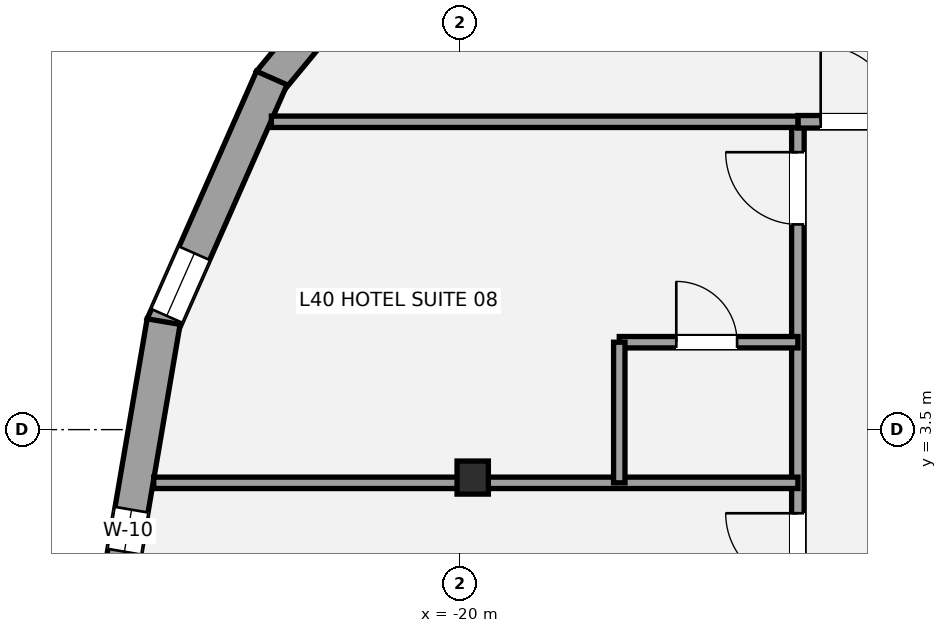
"""IFC4 building model, lengths in metres.
Left out: names, types, materials, properties, quantities, classifications, styles, units other than length and angle.
Written with IfcOpenShell. Run it as: python <this file> out.ifc"""

import sys

from ifc_helpers import new_model, si_unit, direction, frame, frame_2d, origin, origin_2d, place, context, subcontext, project, spatial, rectangle, i_section, extrude, element, fill, save


model = new_model("IFC4")
c1 = context("Model", 3, precision=1e-05, world=origin(), true_north=direction((0.0, 1.0)))
c2 = subcontext(c1, "Body", "Model", "MODEL_VIEW")
j1 = project(units=[si_unit("LENGTHUNIT", "METRE"), si_unit("PLANEANGLEUNIT", "RADIAN")], contexts=[c1])
p1 = place(None, origin())
s1 = spatial("IfcSite", under=j1, at=p1, CompositionType="ELEMENT")
p2 = place(p1, origin())
s2 = spatial("IfcBuilding", under=s1, at=p2, CompositionType="ELEMENT")
p3 = place(p2, frame((0.0, 0.0, 150.2)))
s3 = spatial("IfcBuildingStorey", under=s2, at=p3, CompositionType="ELEMENT", Elevation=150.2)
p4 = place(p3, frame((-19.828, 2.869, 0.0), z_axis=(0.0, 0.0, 1.0), x_axis=(1.0, 0.0, 0.0)))
e1 = element("IfcColumn", 1, at=p4, inside=s3, PredefinedType="COLUMN", context=c2, shape_type="SweptSolid", body=[
    extrude(i_section(OverallWidth=0.412, OverallDepth=0.435, WebThickness=0.036, FlangeThickness=0.057, at=origin_2d()), origin(), (0.0, 0.0, 1.0), 3.2),
])
p5 = place(p3, frame((-22.504, 8.075, 0.0), z_axis=(0.0, 0.0, 1.0), x_axis=(0.637002505989, 0.77086173038, 0.0)))
e2 = element("IfcWall", 2, at=p5, inside=s3, PredefinedType="STANDARD", context=c2, shape_type="SweptSolid", body=[
    extrude(rectangle(XDim=3.908, YDim=0.44, at=frame_2d((1.954, 0.0))), origin(), (0.0, 0.0, 1.0), 2.315),
])
p6 = place(p5, frame((2.76, 0.0, 0.42)))
e3 = element("IfcOpeningElement", 3, at=p6, cuts=e2, PredefinedType="OPENING", context=c2, shape_type="SweptSolid", body=[
    extrude(rectangle(XDim=0.9, YDim=1.35, at=frame_2d((0.45, 0.675))), frame((0.0, 0.23, 0.0), z_axis=(0.0, -1.0, 0.0), x_axis=(1.0, 0.0, 0.0)), (0.0, 0.0, 1.0), 0.46),
])
p7 = place(p3, frame((-23.911, 4.869, 0.0), z_axis=(0.0, 0.0, 1.0), x_axis=(0.403999745193, 0.914759097186, 0.0)))
e4 = element("IfcWall", 4, at=p7, inside=s3, PredefinedType="STANDARD", context=c2, shape_type="SweptSolid", body=[
    extrude(rectangle(XDim=3.561, YDim=0.44, at=frame_2d((1.78, 0.0))), origin(), (0.0, 0.0, 1.0), 2.315),
])
p8 = place(p7, frame((0.14, 0.0, 0.42)))
e5 = element("IfcOpeningElement", 5, at=p8, cuts=e4, PredefinedType="OPENING", context=c2, shape_type="SweptSolid", body=[
    extrude(rectangle(XDim=0.9, YDim=1.35, at=frame_2d((0.45, 0.675))), frame((0.0, 0.23, 0.0), z_axis=(0.0, -1.0, 0.0), x_axis=(1.0, 0.0, 0.0)), (0.0, 0.0, 1.0), 0.46),
])
p9 = place(p3, frame((-24.459, 1.61, 0.0), z_axis=(0.0, 0.0, 1.0), x_axis=(0.168075929829, 0.985774052109, 0.0)))
e6 = element("IfcWall", 6, at=p9, inside=s3, PredefinedType="STANDARD", context=c2, shape_type="SweptSolid", body=[
    extrude(rectangle(XDim=3.358, YDim=0.44, at=frame_2d((1.679, 0.0))), origin(), (0.0, 0.0, 1.0), 2.315),
])
p10 = place(p9, frame((0.288, 0.0, 0.58)))
e7 = element("IfcOpeningElement", 7, at=p10, cuts=e6, PredefinedType="OPENING", context=c2, shape_type="SweptSolid", body=[
    extrude(rectangle(XDim=0.56, YDim=1.15, at=frame_2d((0.28, 0.575))), frame((0.0, 0.23, 0.0), z_axis=(0.0, -1.0, 0.0), x_axis=(1.0, 0.0, 0.0)), (0.0, 0.0, 1.0), 0.46),
])
p11 = place(p3, frame((-15.55, -13.587, 0.0), z_axis=(0.0, 0.0, 1.0), x_axis=(0.0, 1.0, 0.0)))
e8 = element("IfcWall", 8, at=p11, inside=s3, PredefinedType="PARTITIONING", context=c2, shape_type="SweptSolid", body=[
    extrude(rectangle(XDim=21.137, YDim=0.165, at=frame_2d((10.568, 0.0))), origin(), (0.0, 0.0, 1.0), 2.473),
])
p12 = place(p11, frame((6.587, 0.0, 0.0)))
e9 = element("IfcOpeningElement", 9, at=p12, cuts=e8, PredefinedType="OPENING", context=c2, shape_type="SweptSolid", body=[
    extrude(rectangle(XDim=0.85, YDim=2.1, at=frame_2d((0.425, 1.05))), frame((0.0, 0.093, 0.0), z_axis=(0.0, -1.0, 0.0), x_axis=(1.0, 0.0, 0.0)), (0.0, 0.0, 1.0), 0.185),
])
p13 = place(p11, frame((10.637, 0.0, 0.0)))
e10 = element("IfcOpeningElement", 10, at=p13, cuts=e8, PredefinedType="OPENING", context=c2, shape_type="SweptSolid", body=[
    extrude(rectangle(XDim=0.95, YDim=2.15, at=frame_2d((0.475, 1.075))), frame((0.0, 0.093, 0.0), z_axis=(0.0, -1.0, 0.0), x_axis=(1.0, 0.0, 0.0)), (0.0, 0.0, 1.0), 0.185),
])
p14 = place(p11, frame((15.037, 0.0, 0.0)))
e11 = element("IfcOpeningElement", 11, at=p14, cuts=e8, PredefinedType="OPENING", context=c2, shape_type="SweptSolid", body=[
    extrude(rectangle(XDim=0.95, YDim=2.15, at=frame_2d((0.475, 1.075))), frame((0.0, 0.093, 0.0), z_axis=(0.0, -1.0, 0.0), x_axis=(1.0, 0.0, 0.0)), (0.0, 0.0, 1.0), 0.185),
])
p15 = place(p11, frame((19.787, 0.0, 0.0)))
e12 = element("IfcOpeningElement", 12, at=p15, cuts=e8, PredefinedType="OPENING", context=c2, shape_type="SweptSolid", body=[
    extrude(rectangle(XDim=0.95, YDim=2.15, at=frame_2d((0.475, 1.075))), frame((0.0, 0.093, 0.0), z_axis=(0.0, -1.0, 0.0), x_axis=(1.0, 0.0, 0.0)), (0.0, 0.0, 1.0), 0.185),
])
p16 = place(p3, frame((-15.55, 7.55, 0.0), z_axis=(0.0, 0.0, 1.0), x_axis=(1.0, 0.0, 0.0)))
e13 = element("IfcWall", 13, at=p16, inside=s3, PredefinedType="PARTITIONING", context=c2, shape_type="SweptSolid", body=[
    extrude(rectangle(XDim=1.75, YDim=0.165, at=frame_2d((0.875, 0.0))), origin(), (0.0, 0.0, 1.0), 3.02),
])
p17 = place(p16, frame((0.3, 0.0, 0.0)))
e14 = element("IfcOpeningElement", 14, at=p17, cuts=e13, PredefinedType="OPENING", context=c2, shape_type="SweptSolid", body=[
    extrude(rectangle(XDim=1.0, YDim=2.15, at=frame_2d((0.5, 1.075))), frame((0.0, 0.093, 0.0), z_axis=(0.0, -1.0, 0.0), x_axis=(1.0, 0.0, 0.0)), (0.0, 0.0, 1.0), 0.185),
])
p18 = place(p3, frame((-22.477, 7.55, 0.0), z_axis=(0.0, 0.0, 1.0), x_axis=(1.0, 0.0, 0.0)))
e15 = element("IfcWall", 15, at=p18, inside=s3, PredefinedType="PLUMBINGWALL", context=c2, shape_type="SweptSolid", body=[
    extrude(rectangle(XDim=6.927, YDim=0.15, at=frame_2d((3.464, 0.0))), origin(), (0.0, 0.0, 1.0), 2.473),
])
p19 = place(p3, frame((-24.025, 2.8, 0.0), z_axis=(0.0, 0.0, 1.0), x_axis=(1.0, 0.0, 0.0)))
e16 = element("IfcWall", 16, at=p19, inside=s3, PredefinedType="PLUMBINGWALL", context=c2, shape_type="SweptSolid", body=[
    extrude(rectangle(XDim=8.475, YDim=0.15, at=frame_2d((4.238, 0.0))), origin(), (0.0, 0.0, 1.0), 2.473),
])
p20 = place(p3, frame((-17.9, 4.65, 0.0), z_axis=(0.0, 0.0, 1.0), x_axis=(1.0, 0.0, 0.0)))
e17 = element("IfcWall", 17, at=p20, inside=s3, PredefinedType="PLUMBINGWALL", context=c2, shape_type="SweptSolid", body=[
    extrude(rectangle(XDim=2.35, YDim=0.15, at=frame_2d((1.175, 0.0))), origin(), (0.0, 0.0, 1.0), 2.473),
])
p21 = place(p20, frame((0.75, 0.0, 0.0)))
e18 = element("IfcOpeningElement", 18, at=p21, cuts=e17, PredefinedType="OPENING", context=c2, shape_type="SweptSolid", body=[
    extrude(rectangle(XDim=0.8, YDim=2.1, at=frame_2d((0.4, 1.05))), frame((0.0, 0.085, 0.0), z_axis=(0.0, -1.0, 0.0), x_axis=(1.0, 0.0, 0.0)), (0.0, 0.0, 1.0), 0.17),
])
p22 = place(p3, frame((-17.9, 2.8, 0.0), z_axis=(0.0, 0.0, 1.0), x_axis=(0.0, 1.0, 0.0)))
e19 = element("IfcWall", 19, at=p22, inside=s3, PredefinedType="PLUMBINGWALL", context=c2, shape_type="SweptSolid", body=[
    extrude(rectangle(XDim=1.85, YDim=0.15, at=frame_2d((0.925, 0.0))), origin(), (0.0, 0.0, 1.0), 3.02),
])
p23 = place(p10, origin())
e20 = element("IfcWindow", 20, at=p23, inside=s3, PartitioningType="SINGLE_PANEL", PredefinedType="WINDOW", context=c2, shape_type="SweptSolid", body=[
    extrude(rectangle(XDim=0.56, YDim=1.15, at=frame_2d((0.28, 0.575))), frame((0.0, -0.01, 0.0), z_axis=(0.0, -1.0, 0.0), x_axis=(1.0, 0.0, 0.0)), (0.0, 0.0, 1.0), 0.06),
])
fill(e7, e20)
p24 = place(p8, origin())
e21 = element("IfcWindow", 21, at=p24, inside=s3, PartitioningType="SINGLE_PANEL", PredefinedType="WINDOW", context=c2, shape_type="SweptSolid", body=[
    extrude(rectangle(XDim=0.9, YDim=1.35, at=frame_2d((0.45, 0.675))), frame((0.0, -0.01, 0.0), z_axis=(0.0, -1.0, 0.0), x_axis=(1.0, 0.0, 0.0)), (0.0, 0.0, 1.0), 0.06),
])
fill(e5, e21)
p25 = place(p17, origin())
e22 = element("IfcDoor", 22, at=p25, inside=s3, OperationType="SINGLE_SWING_LEFT", PredefinedType="DOOR", context=c2, shape_type="SweptSolid", body=[
    extrude(rectangle(XDim=1.0, YDim=2.15, at=frame_2d((0.5, 1.075))), frame((0.0, 0.025, 0.0), z_axis=(0.0, -1.0, 0.0), x_axis=(1.0, 0.0, 0.0)), (0.0, 0.0, 1.0), 0.05),
])
fill(e14, e22)
p26 = place(p14, origin())
e23 = element("IfcDoor", 23, at=p26, inside=s3, OperationType="SINGLE_SWING_RIGHT", PredefinedType="DOOR", context=c2, shape_type="SweptSolid", body=[
    extrude(rectangle(XDim=0.95, YDim=2.15, at=frame_2d((0.475, 1.075))), frame((0.0, 0.025, 0.0), z_axis=(0.0, -1.0, 0.0), x_axis=(1.0, 0.0, 0.0)), (0.0, 0.0, 1.0), 0.05),
])
fill(e11, e23)
p27 = place(p15, origin())
e24 = element("IfcDoor", 24, at=p27, inside=s3, OperationType="SINGLE_SWING_RIGHT", PredefinedType="DOOR", context=c2, shape_type="SweptSolid", body=[
    extrude(rectangle(XDim=0.95, YDim=2.15, at=frame_2d((0.475, 1.075))), frame((0.0, 0.025, 0.0), z_axis=(0.0, -1.0, 0.0), x_axis=(1.0, 0.0, 0.0)), (0.0, 0.0, 1.0), 0.05),
])
fill(e12, e24)
p28 = place(p21, origin())
e25 = element("IfcDoor", 25, at=p28, inside=s3, OperationType="SINGLE_SWING_LEFT", PredefinedType="DOOR", context=c2, shape_type="SweptSolid", body=[
    extrude(rectangle(XDim=0.8, YDim=2.1, at=frame_2d((0.4, 1.05))), frame((0.0, 0.025, 0.0), z_axis=(0.0, -1.0, 0.0), x_axis=(1.0, 0.0, 0.0)), (0.0, 0.0, 1.0), 0.05),
])
fill(e18, e25)
save(model, sys.argv[1])
